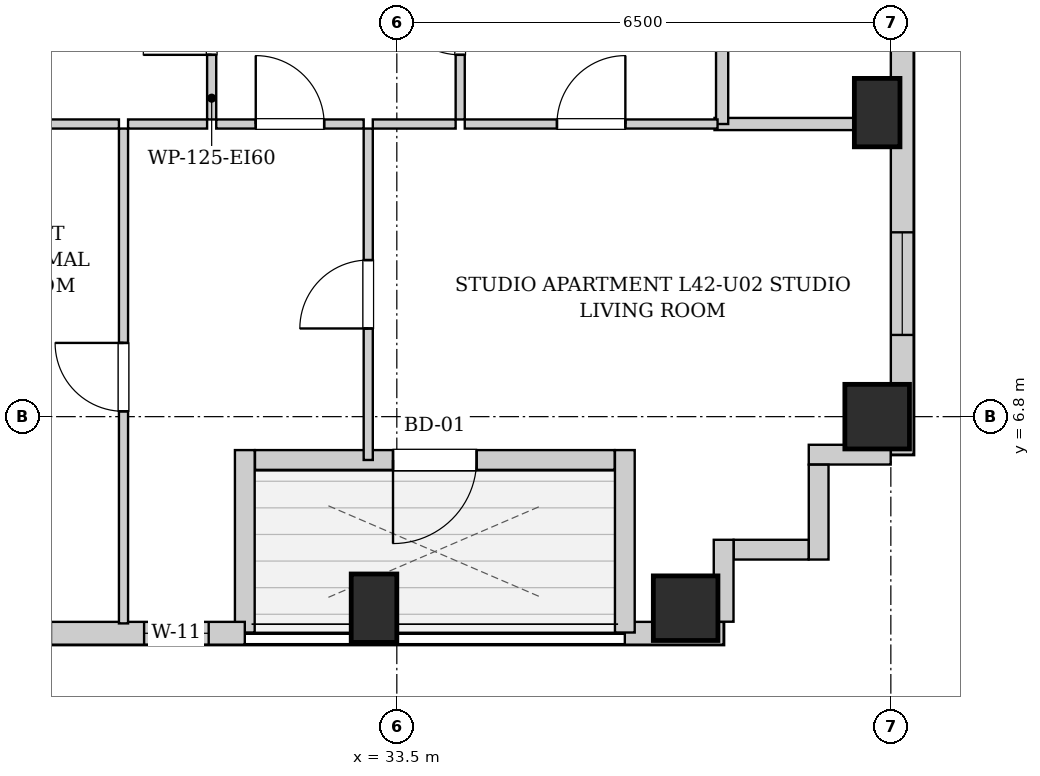
"""IFC4 building model, lengths in metres.
Left out: names, types, materials, properties, quantities, classifications, styles, units other than length and angle.
Written with IfcOpenShell. Run it as: python <this file> out.ifc"""

import sys

from ifc_helpers import new_model, si_unit, direction, frame, frame_2d, origin, origin_2d, place, context, subcontext, project, spatial, rectangle, extrude, element, fill, save


model = new_model("IFC4")
c1 = context("Model", 3, precision=1e-05, world=origin(), true_north=direction((0.0, 1.0)))
c2 = subcontext(c1, "Body", "Model", "MODEL_VIEW")
j1 = project(units=[si_unit("LENGTHUNIT", "METRE"), si_unit("PLANEANGLEUNIT", "RADIAN")], contexts=[c1])
p1 = place(None, origin())
s1 = spatial("IfcSite", under=j1, at=p1, CompositionType="ELEMENT")
p2 = place(p1, origin())
s2 = spatial("IfcBuilding", under=s1, at=p2, CompositionType="ELEMENT")
p3 = place(p2, frame((0.0, 0.0, 147.15)))
s3 = spatial("IfcBuildingStorey", under=s2, at=p3, CompositionType="ELEMENT", Elevation=147.15)
p4 = place(p3, frame((33.2, 4.28, 0.0), z_axis=(0.0, 0.0, 1.0), x_axis=(1.0, 0.0, 0.0)))
e1 = element("IfcColumn", 1, at=p4, inside=s3, PredefinedType="COLUMN", context=c2, shape_type="SweptSolid", body=[
    extrude(rectangle(XDim=0.6, YDim=0.9, at=origin_2d()), origin(), (0.0, 0.0, 1.0), 3.25),
])
for number, where, z_axis, x_axis in (
    (2, (37.3, 4.28, 0.0), (0.0, 0.0, 1.0), (1.0, 0.0, 0.0)),
    (3, (39.82, 6.8, 0.0), (0.0, 0.0, 1.0), (1.0, 0.0, 0.0)),
):
    element("IfcColumn", number, at=place(p3, frame(where, z_axis=z_axis, x_axis=x_axis)), inside=s3, PredefinedType="COLUMN", context=c2, shape_type="SweptSolid", body=[
        extrude(rectangle(XDim=0.85, YDim=0.85, at=origin_2d()), origin(), (0.0, 0.0, 1.0), 3.25),
    ])
p5 = place(p3, frame((39.82, 10.8, 0.0), z_axis=(0.0, 0.0, 1.0), x_axis=(1.0, 0.0, 0.0)))
e4 = element("IfcColumn", 4, at=p5, inside=s3, PredefinedType="COLUMN", context=c2, shape_type="SweptSolid", body=[
    extrude(rectangle(XDim=0.6, YDim=0.9, at=origin_2d()), origin(), (0.0, 0.0, 1.0), 3.25),
])
p6 = place(p3, frame((40.15, 40.8, 0.0), z_axis=(0.0, 0.0, 1.0), x_axis=(0.0, -1.0, 0.0)))
e5 = element("IfcWall", 5, at=p6, inside=s3, PredefinedType="SOLIDWALL", context=c2, shape_type="SweptSolid", body=[
    extrude(rectangle(XDim=34.5, YDim=0.3, at=frame_2d((17.25, 0.0))), origin(), (0.0, 0.0, 1.0), 2.99),
])
p7 = place(p6, frame((31.575, 0.0, 0.55)))
e6 = element("IfcOpeningElement", 6, at=p7, cuts=e5, PredefinedType="OPENING", context=c2, shape_type="SweptSolid", body=[
    extrude(rectangle(XDim=1.35, YDim=1.2, at=frame_2d((0.675, 0.6))), frame((0.0, 0.16, 0.0), z_axis=(0.0, -1.0, 0.0), x_axis=(1.0, 0.0, 0.0)), (0.0, 0.0, 1.0), 0.32),
])
p8 = place(p6, frame((3.075, 0.0, 0.55)))
e7 = element("IfcOpeningElement", 7, at=p8, cuts=e5, PredefinedType="OPENING", context=c2, shape_type="SweptSolid", body=[
    extrude(rectangle(XDim=1.35, YDim=1.2, at=frame_2d((0.675, 0.6))), frame((0.0, 0.16, 0.0), z_axis=(0.0, -1.0, 0.0), x_axis=(1.0, 0.0, 0.0)), (0.0, 0.0, 1.0), 0.32),
])
p9 = place(p6, frame((1.085, 0.0, 0.55)))
e8 = element("IfcOpeningElement", 8, at=p9, cuts=e5, PredefinedType="OPENING", context=c2, shape_type="SweptSolid", body=[
    extrude(rectangle(XDim=1.35, YDim=1.2, at=frame_2d((0.675, 0.6))), frame((0.0, 0.16, 0.0), z_axis=(0.0, -1.0, 0.0), x_axis=(1.0, 0.0, 0.0)), (0.0, 0.0, 1.0), 0.32),
])
p10 = place(p6, frame((22.8, 0.0, 0.55)))
e9 = element("IfcOpeningElement", 9, at=p10, cuts=e5, PredefinedType="OPENING", context=c2, shape_type="SweptSolid", body=[
    extrude(rectangle(XDim=1.35, YDim=1.2, at=frame_2d((0.675, 0.6))), frame((0.0, 0.16, 0.0), z_axis=(0.0, -1.0, 0.0), x_axis=(1.0, 0.0, 0.0)), (0.0, 0.0, 1.0), 0.32),
])
p11 = place(p6, frame((13.425, 0.0, 0.55)))
e10 = element("IfcOpeningElement", 10, at=p11, cuts=e5, PredefinedType="OPENING", context=c2, shape_type="SweptSolid", body=[
    extrude(rectangle(XDim=1.35, YDim=1.2, at=frame_2d((0.675, 0.6))), frame((0.0, 0.16, 0.0), z_axis=(0.0, -1.0, 0.0), x_axis=(1.0, 0.0, 0.0)), (0.0, 0.0, 1.0), 0.32),
])
p12 = place(p3, frame((37.8, 3.95, 0.0), z_axis=(0.0, 0.0, 1.0), x_axis=(-1.0, 0.0, 0.0)))
e11 = element("IfcWall", 11, at=p12, inside=s3, PredefinedType="SOLIDWALL", context=c2, shape_type="SweptSolid", body=[
    extrude(rectangle(XDim=1.3, YDim=0.3, at=frame_2d((0.65, 0.0))), origin(), (0.0, 0.0, 1.0), 2.99),
])
p13 = place(p3, frame((36.5, 3.96, 0.0), z_axis=(0.0, 0.0, 1.0), x_axis=(0.0, 1.0, 0.0)))
e12 = element("IfcWall", 12, at=p13, inside=s3, PredefinedType="SOLIDWALL", context=c2, shape_type="SweptSolid", body=[
    extrude(rectangle(XDim=2.4, YDim=0.26, at=frame_2d((1.2, 0.0))), origin(), (0.0, 0.0, 1.0), 2.99),
])
p14 = place(p3, frame((36.366, 6.23, 0.0), z_axis=(0.0, 0.0, 1.0), x_axis=(-1.0, 0.0, 0.0)))
e13 = element("IfcWall", 13, at=p14, inside=s3, PredefinedType="SOLIDWALL", context=c2, shape_type="SweptSolid", body=[
    extrude(rectangle(XDim=4.732, YDim=0.26, at=frame_2d((2.366, 0.0))), origin(), (0.0, 0.0, 1.0), 2.99),
])
p15 = place(p14, frame((1.816, 0.0, 0.0)))
e14 = element("IfcOpeningElement", 14, at=p15, cuts=e13, PredefinedType="OPENING", context=c2, shape_type="SweptSolid", body=[
    extrude(rectangle(XDim=1.1, YDim=2.0, at=frame_2d((0.55, 1.0))), frame((0.0, 0.14, 0.0), z_axis=(0.0, -1.0, 0.0), x_axis=(1.0, 0.0, 0.0)), (0.0, 0.0, 1.0), 0.28),
])
p16 = place(p3, frame((31.5, 6.36, 0.0), z_axis=(0.0, 0.0, 1.0), x_axis=(0.0, -1.0, 0.0)))
e15 = element("IfcWall", 15, at=p16, inside=s3, PredefinedType="SOLIDWALL", context=c2, shape_type="SweptSolid", body=[
    extrude(rectangle(XDim=2.4, YDim=0.26, at=frame_2d((1.2, 0.0))), origin(), (0.0, 0.0, 1.0), 2.99),
])
p17 = place(p3, frame((31.5, 3.95, 0.0), z_axis=(0.0, 0.0, 1.0), x_axis=(-1.0, 0.0, 0.0)))
e16 = element("IfcWall", 16, at=p17, inside=s3, PredefinedType="SOLIDWALL", context=c2, shape_type="SweptSolid", body=[
    extrude(rectangle(XDim=13.2, YDim=0.3, at=frame_2d((6.6, 0.0))), origin(), (0.0, 0.0, 1.0), 2.99),
])
p18 = place(p17, frame((11.476, 0.0, 0.55)))
e17 = element("IfcOpeningElement", 17, at=p18, cuts=e16, PredefinedType="OPENING", context=c2, shape_type="SweptSolid", body=[
    extrude(rectangle(XDim=1.35, YDim=1.2, at=frame_2d((0.675, 0.6))), frame((0.0, 0.16, 0.0), z_axis=(0.0, -1.0, 0.0), x_axis=(1.0, 0.0, 0.0)), (0.0, 0.0, 1.0), 0.32),
])
p19 = place(p17, frame((9.0, 0.0, 0.55)))
e18 = element("IfcOpeningElement", 18, at=p19, cuts=e16, PredefinedType="OPENING", context=c2, shape_type="SweptSolid", body=[
    extrude(rectangle(XDim=1.35, YDim=1.2, at=frame_2d((0.675, 0.6))), frame((0.0, 0.16, 0.0), z_axis=(0.0, -1.0, 0.0), x_axis=(1.0, 0.0, 0.0)), (0.0, 0.0, 1.0), 0.32),
])
p20 = place(p17, frame((2.55, 0.0, 0.55)))
e19 = element("IfcOpeningElement", 19, at=p20, cuts=e16, PredefinedType="OPENING", context=c2, shape_type="SweptSolid", body=[
    extrude(rectangle(XDim=1.35, YDim=1.2, at=frame_2d((0.675, 0.6))), frame((0.0, 0.16, 0.0), z_axis=(0.0, -1.0, 0.0), x_axis=(1.0, 0.0, 0.0)), (0.0, 0.0, 1.0), 0.32),
])
p21 = place(p17, frame((0.475, 0.0, 0.55)))
e20 = element("IfcOpeningElement", 20, at=p21, cuts=e16, PredefinedType="OPENING", context=c2, shape_type="SweptSolid", body=[
    extrude(rectangle(XDim=0.85, YDim=1.2, at=frame_2d((0.425, 0.6))), frame((0.0, 0.16, 0.0), z_axis=(0.0, -1.0, 0.0), x_axis=(1.0, 0.0, 0.0)), (0.0, 0.0, 1.0), 0.32),
])
p22 = place(p3, frame((39.998, 6.3, 0.0), z_axis=(0.0, 0.0, 1.0), x_axis=(-1.0, 0.0, 0.0)))
e21 = element("IfcWall", 21, at=p22, inside=s3, PredefinedType="SOLIDWALL", context=c2, shape_type="SweptSolid", body=[
    extrude(rectangle(XDim=1.078, YDim=0.26, at=frame_2d((0.539, 0.0))), origin(), (0.0, 0.0, 1.0), 2.99),
])
p23 = place(p3, frame((39.05, 6.168, 0.0), z_axis=(0.0, 0.0, 1.0), x_axis=(0.0, -1.0, 0.0)))
e22 = element("IfcWall", 22, at=p23, inside=s3, PredefinedType="SOLIDWALL", context=c2, shape_type="SweptSolid", body=[
    extrude(rectangle(XDim=1.248, YDim=0.26, at=frame_2d((0.624, 0.0))), origin(), (0.0, 0.0, 1.0), 2.99),
])
p24 = place(p3, frame((38.918, 5.05, 0.0), z_axis=(0.0, 0.0, 1.0), x_axis=(-1.0, 0.0, 0.0)))
e23 = element("IfcWall", 23, at=p24, inside=s3, PredefinedType="SOLIDWALL", context=c2, shape_type="SweptSolid", body=[
    extrude(rectangle(XDim=0.986, YDim=0.26, at=frame_2d((0.493, 0.0))), origin(), (0.0, 0.0, 1.0), 2.99),
])
p25 = place(p3, frame((37.8, 5.18, 0.0), z_axis=(0.0, 0.0, 1.0), x_axis=(0.0, -1.0, 0.0)))
e24 = element("IfcWall", 24, at=p25, inside=s3, PredefinedType="SOLIDWALL", context=c2, shape_type="SweptSolid", body=[
    extrude(rectangle(XDim=1.078, YDim=0.26, at=frame_2d((0.539, 0.0))), origin(), (0.0, 0.0, 1.0), 2.99),
])
p26 = place(p3, frame((37.68, 10.65, 0.0), z_axis=(0.0, 0.0, 1.0), x_axis=(1.0, 0.0, 0.0)))
e25 = element("IfcWall", 25, at=p26, inside=s3, PredefinedType="PARTITIONING", context=c2, shape_type="SweptSolid", body=[
    extrude(rectangle(XDim=2.34, YDim=0.16, at=frame_2d((1.17, 0.0))), origin(), (0.0, 0.0, 1.0), 2.99),
])
p27 = place(p3, frame((37.78, 10.65, 0.0), z_axis=(0.0, 0.0, 1.0), x_axis=(0.0, 1.0, 0.0)))
e26 = element("IfcWall", 26, at=p27, inside=s3, PredefinedType="PARTITIONING", context=c2, shape_type="SweptSolid", body=[
    extrude(rectangle(XDim=2.66, YDim=0.16, at=frame_2d((1.33, 0.0))), origin(), (0.0, 0.0, 1.0), 2.99),
])
p28 = place(p3, frame((31.064, 10.71, 0.0), z_axis=(0.0, 0.0, 1.0), x_axis=(0.0, 1.0, 0.0)))
e27 = element("IfcWall", 27, at=p28, inside=s3, PredefinedType="PARTITIONING", context=c2, shape_type="SweptSolid", body=[
    extrude(rectangle(XDim=2.6, YDim=0.12, at=frame_2d((1.3, 0.0))), origin(), (0.0, 0.0, 1.0), 2.99),
])
p29 = place(p28, frame((0.85, 0.0, 0.0)))
e28 = element("IfcOpeningElement", 28, at=p29, cuts=e27, PredefinedType="OPENING", context=c2, shape_type="SweptSolid", body=[
    extrude(rectangle(XDim=0.9, YDim=2.05, at=frame_2d((0.45, 1.025))), frame((0.0, 0.07, 0.0), z_axis=(0.0, -1.0, 0.0), x_axis=(1.0, 0.0, 0.0)), (0.0, 0.0, 1.0), 0.14),
])
p30 = place(p3, frame((28.804, 10.65, 0.0), z_axis=(0.0, 0.0, 1.0), x_axis=(1.0, 0.0, 0.0)))
e29 = element("IfcWall", 29, at=p30, inside=s3, PredefinedType="PARTITIONING", context=c2, shape_type="SweptSolid", body=[
    extrude(rectangle(XDim=1.04, YDim=0.12, at=frame_2d((0.52, 0.0))), origin(), (0.0, 0.0, 1.0), 2.99),
])
p31 = place(p3, frame((29.964, 10.65, 0.0), z_axis=(0.0, 0.0, 1.0), x_axis=(1.0, 0.0, 0.0)))
e30 = element("IfcWall", 30, at=p31, inside=s3, PredefinedType="PARTITIONING", context=c2, shape_type="SweptSolid", body=[
    extrude(rectangle(XDim=1.04, YDim=0.12, at=frame_2d((0.52, 0.0))), origin(), (0.0, 0.0, 1.0), 2.99),
])
p32 = place(p3, frame((34.334, 10.71, 0.0), z_axis=(0.0, 0.0, 1.0), x_axis=(0.0, 1.0, 0.0)))
e31 = element("IfcWall", 31, at=p32, inside=s3, PredefinedType="PARTITIONING", context=c2, shape_type="SweptSolid", body=[
    extrude(rectangle(XDim=2.6, YDim=0.12, at=frame_2d((1.3, 0.0))), origin(), (0.0, 0.0, 1.0), 2.99),
])
p33 = place(p32, frame((0.85, 0.0, 0.0)))
e32 = element("IfcOpeningElement", 32, at=p33, cuts=e31, PredefinedType="OPENING", context=c2, shape_type="SweptSolid", body=[
    extrude(rectangle(XDim=0.9, YDim=2.05, at=frame_2d((0.45, 1.025))), frame((0.0, 0.07, 0.0), z_axis=(0.0, -1.0, 0.0), x_axis=(1.0, 0.0, 0.0)), (0.0, 0.0, 1.0), 0.14),
])
p34 = place(p3, frame((31.124, 10.65, 0.0), z_axis=(0.0, 0.0, 1.0), x_axis=(1.0, 0.0, 0.0)))
e33 = element("IfcWall", 33, at=p34, inside=s3, PredefinedType="PARTITIONING", context=c2, shape_type="SweptSolid", body=[
    extrude(rectangle(XDim=1.94, YDim=0.12, at=frame_2d((0.97, 0.0))), origin(), (0.0, 0.0, 1.0), 2.99),
])
p35 = place(p34, frame((0.52, 0.0, 0.0)))
e34 = element("IfcOpeningElement", 34, at=p35, cuts=e33, PredefinedType="OPENING", context=c2, shape_type="SweptSolid", body=[
    extrude(rectangle(XDim=0.9, YDim=2.05, at=frame_2d((0.45, 1.025))), frame((0.0, 0.07, 0.0), z_axis=(0.0, -1.0, 0.0), x_axis=(1.0, 0.0, 0.0)), (0.0, 0.0, 1.0), 0.14),
])
p36 = place(p3, frame((33.184, 10.65, 0.0), z_axis=(0.0, 0.0, 1.0), x_axis=(1.0, 0.0, 0.0)))
e35 = element("IfcWall", 35, at=p36, inside=s3, PredefinedType="PARTITIONING", context=c2, shape_type="SweptSolid", body=[
    extrude(rectangle(XDim=1.09, YDim=0.12, at=frame_2d((0.545, 0.0))), origin(), (0.0, 0.0, 1.0), 2.99),
])
p37 = place(p3, frame((34.394, 10.65, 0.0), z_axis=(0.0, 0.0, 1.0), x_axis=(1.0, 0.0, 0.0)))
e36 = element("IfcWall", 36, at=p37, inside=s3, PredefinedType="PARTITIONING", context=c2, shape_type="SweptSolid", body=[
    extrude(rectangle(XDim=3.326, YDim=0.12, at=frame_2d((1.663, 0.0))), origin(), (0.0, 0.0, 1.0), 2.99),
])
p38 = place(p37, frame((1.213, 0.0, 0.0)))
e37 = element("IfcOpeningElement", 37, at=p38, cuts=e36, PredefinedType="OPENING", context=c2, shape_type="SweptSolid", body=[
    extrude(rectangle(XDim=0.9, YDim=2.05, at=frame_2d((0.45, 1.025))), frame((0.0, 0.07, 0.0), z_axis=(0.0, -1.0, 0.0), x_axis=(1.0, 0.0, 0.0)), (0.0, 0.0, 1.0), 0.14),
])
p39 = place(p3, frame((29.904, 4.08, 0.0), z_axis=(0.0, 0.0, 1.0), x_axis=(0.0, 1.0, 0.0)))
e38 = element("IfcWall", 38, at=p39, inside=s3, PredefinedType="PARTITIONING", context=c2, shape_type="SweptSolid", body=[
    extrude(rectangle(XDim=6.51, YDim=0.12, at=frame_2d((3.255, 0.0))), origin(), (0.0, 0.0, 1.0), 2.99),
])
p40 = place(p39, frame((2.79, 0.0, 0.0)))
e39 = element("IfcOpeningElement", 39, at=p40, cuts=e38, PredefinedType="OPENING", context=c2, shape_type="SweptSolid", body=[
    extrude(rectangle(XDim=0.9, YDim=2.05, at=frame_2d((0.45, 1.025))), frame((0.0, 0.07, 0.0), z_axis=(0.0, -1.0, 0.0), x_axis=(1.0, 0.0, 0.0)), (0.0, 0.0, 1.0), 0.14),
])
p41 = place(p3, frame((33.124, 6.23, 0.0), z_axis=(0.0, 0.0, 1.0), x_axis=(0.0, 1.0, 0.0)))
e40 = element("IfcWall", 40, at=p41, inside=s3, PredefinedType="PARTITIONING", context=c2, shape_type="SweptSolid", body=[
    extrude(rectangle(XDim=4.36, YDim=0.12, at=frame_2d((2.18, 0.0))), origin(), (0.0, 0.0, 1.0), 2.442),
])
p42 = place(p41, frame((1.73, 0.0, 0.0)))
e41 = element("IfcOpeningElement", 41, at=p42, cuts=e40, PredefinedType="OPENING", context=c2, shape_type="SweptSolid", body=[
    extrude(rectangle(XDim=0.9, YDim=2.05, at=frame_2d((0.45, 1.025))), frame((0.0, 0.07, 0.0), z_axis=(0.0, -1.0, 0.0), x_axis=(1.0, 0.0, 0.0)), (0.0, 0.0, 1.0), 0.14),
])
p43 = place(p29, origin())
e42 = element("IfcDoor", 42, at=p43, inside=s3, OperationType="SINGLE_SWING_LEFT", PredefinedType="DOOR", context=c2, shape_type="SweptSolid", body=[
    extrude(rectangle(XDim=0.9, YDim=2.05, at=frame_2d((0.45, 1.025))), frame((0.0, 0.025, 0.0), z_axis=(0.0, -1.0, 0.0), x_axis=(1.0, 0.0, 0.0)), (0.0, 0.0, 1.0), 0.05),
])
fill(e28, e42)
p44 = place(p33, origin())
e43 = element("IfcDoor", 43, at=p44, inside=s3, OperationType="SINGLE_SWING_RIGHT", PredefinedType="DOOR", context=c2, shape_type="SweptSolid", body=[
    extrude(rectangle(XDim=0.9, YDim=2.05, at=frame_2d((0.45, 1.025))), frame((0.0, 0.025, 0.0), z_axis=(0.0, -1.0, 0.0), x_axis=(1.0, 0.0, 0.0)), (0.0, 0.0, 1.0), 0.05),
])
fill(e32, e43)
p45 = place(p35, origin())
e44 = element("IfcDoor", 44, at=p45, inside=s3, OperationType="SINGLE_SWING_LEFT", PredefinedType="DOOR", context=c2, shape_type="SweptSolid", body=[
    extrude(rectangle(XDim=0.9, YDim=2.05, at=frame_2d((0.45, 1.025))), frame((0.0, 0.025, 0.0), z_axis=(0.0, -1.0, 0.0), x_axis=(1.0, 0.0, 0.0)), (0.0, 0.0, 1.0), 0.05),
])
fill(e34, e44)
p46 = place(p38, origin())
e45 = element("IfcDoor", 45, at=p46, inside=s3, OperationType="SINGLE_SWING_RIGHT", PredefinedType="DOOR", context=c2, shape_type="SweptSolid", body=[
    extrude(rectangle(XDim=0.9, YDim=2.05, at=frame_2d((0.45, 1.025))), frame((0.0, 0.025, 0.0), z_axis=(0.0, -1.0, 0.0), x_axis=(1.0, 0.0, 0.0)), (0.0, 0.0, 1.0), 0.05),
])
fill(e37, e45)
p47 = place(p40, origin())
e46 = element("IfcDoor", 46, at=p47, inside=s3, OperationType="SINGLE_SWING_RIGHT", PredefinedType="DOOR", context=c2, shape_type="SweptSolid", body=[
    extrude(rectangle(XDim=0.9, YDim=2.05, at=frame_2d((0.45, 1.025))), frame((0.0, 0.025, 0.0), z_axis=(0.0, -1.0, 0.0), x_axis=(1.0, 0.0, 0.0)), (0.0, 0.0, 1.0), 0.05),
])
fill(e39, e46)
p48 = place(p42, origin())
e47 = element("IfcDoor", 47, at=p48, inside=s3, OperationType="SINGLE_SWING_LEFT", PredefinedType="DOOR", context=c2, shape_type="SweptSolid", body=[
    extrude(rectangle(XDim=0.9, YDim=2.05, at=frame_2d((0.45, 1.025))), frame((0.0, 0.025, 0.0), z_axis=(0.0, -1.0, 0.0), x_axis=(1.0, 0.0, 0.0)), (0.0, 0.0, 1.0), 0.05),
])
fill(e41, e47)
p49 = place(p15, origin())
e48 = element("IfcDoor", 48, at=p49, inside=s3, OperationType="SINGLE_SWING_RIGHT", PredefinedType="DOOR", context=c2, shape_type="SweptSolid", body=[
    extrude(rectangle(XDim=1.1, YDim=2.0, at=frame_2d((0.55, 1.0))), frame((0.0, 0.025, 0.0), z_axis=(0.0, -1.0, 0.0), x_axis=(1.0, 0.0, 0.0)), (0.0, 0.0, 1.0), 0.05),
])
fill(e14, e48)
p50 = place(p21, origin())
e49 = element("IfcWindow", 49, at=p50, inside=s3, PartitioningType="SINGLE_PANEL", PredefinedType="WINDOW", context=c2, shape_type="SweptSolid", body=[
    extrude(rectangle(XDim=0.85, YDim=1.2, at=frame_2d((0.425, 0.6))), frame((0.0, 0.03, 0.0), z_axis=(0.0, -1.0, 0.0), x_axis=(1.0, 0.0, 0.0)), (0.0, 0.0, 1.0), 0.06),
])
fill(e20, e49)
p51 = place(p7, origin())
e50 = element("IfcWindow", 50, at=p51, inside=s3, PartitioningType="SINGLE_PANEL", PredefinedType="WINDOW", context=c2, shape_type="SweptSolid", body=[
    extrude(rectangle(XDim=1.35, YDim=1.2, at=frame_2d((0.675, 0.6))), frame((0.0, 0.03, 0.0), z_axis=(0.0, -1.0, 0.0), x_axis=(1.0, 0.0, 0.0)), (0.0, 0.0, 1.0), 0.06),
])
fill(e6, e50)
save(model, sys.argv[1])
